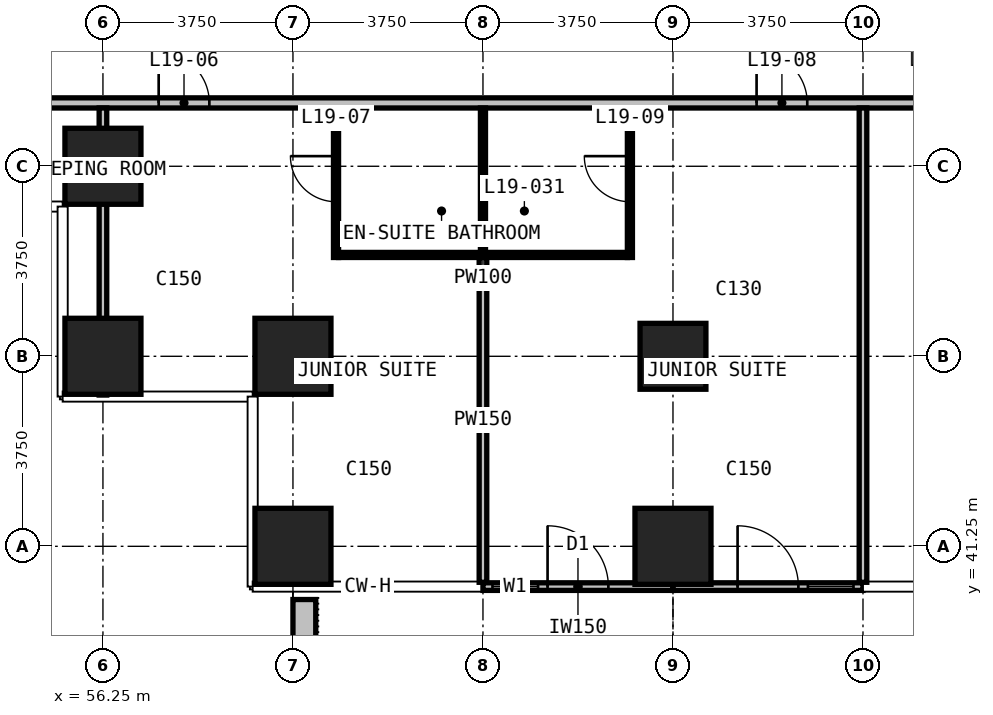
"""IFC4 building model, lengths in metres.
Left out: names, types, materials, properties, quantities, classifications, styles, units other than length and angle.
Written with IfcOpenShell. Run it as: python <this file> out.ifc"""

import sys

from ifc_helpers import new_model, si_unit, direction, frame, frame_2d, origin, origin_2d, place, context, subcontext, project, spatial, rectangle, extrude, element, fill, save


model = new_model("IFC4")
c1 = context("Model", 3, precision=1e-05, world=origin(), true_north=direction((0.0, 1.0)))
c2 = subcontext(c1, "Body", "Model", "MODEL_VIEW")
j1 = project(units=[si_unit("LENGTHUNIT", "METRE"), si_unit("PLANEANGLEUNIT", "RADIAN")], contexts=[c1])
p1 = place(None, origin())
s1 = spatial("IfcSite", under=j1, at=p1, CompositionType="ELEMENT")
p2 = place(p1, origin())
s2 = spatial("IfcBuilding", under=s1, at=p2, CompositionType="ELEMENT")
p3 = place(p2, frame((0.0, 0.0, 82.4)))
s3 = spatial("IfcBuildingStorey", under=s2, at=p3, CompositionType="ELEMENT", Elevation=82.4)
for number, where, z_axis, x_axis in (
    (1, (56.25, 45.0, 0.0), (0.0, 0.0, 1.0), (1.0, 0.0, 0.0)),
    (2, (56.25, 48.75, 0.0), (0.0, 0.0, 1.0), (1.0, 0.0, 0.0)),
    (3, (60.0, 41.25, 0.0), (0.0, 0.0, 1.0), (1.0, 0.0, 0.0)),
    (4, (60.0, 45.0, 0.0), (0.0, 0.0, 1.0), (1.0, 0.0, 0.0)),
    (5, (67.5, 41.25, 0.0), (0.0, 0.0, 1.0), (1.0, 0.0, 0.0)),
):
    element("IfcColumn", number, at=place(p3, frame(where, z_axis=z_axis, x_axis=x_axis)), inside=s3, PredefinedType="COLUMN", context=c2, shape_type="SweptSolid", body=[
        extrude(rectangle(XDim=1.5, YDim=1.5, at=origin_2d()), origin(), (0.0, 0.0, 1.0), 3.3),
    ])
p4 = place(p3, frame((67.5, 45.0, 0.0), z_axis=(0.0, 0.0, 1.0), x_axis=(1.0, 0.0, 0.0)))
e6 = element("IfcColumn", 6, at=p4, inside=s3, PredefinedType="COLUMN", context=c2, shape_type="SweptSolid", body=[
    extrude(rectangle(XDim=1.3, YDim=1.3, at=origin_2d()), origin(), (0.0, 0.0, 1.0), 3.3),
])
p5 = place(p3, frame((63.75, 40.455, 0.0), z_axis=(0.0, 0.0, 1.0), x_axis=(1.0, 0.0, 0.0)))
e7 = element("IfcWall", 7, at=p5, inside=s3, PredefinedType="SOLIDWALL", context=c2, shape_type="SweptSolid", body=[
    extrude(rectangle(XDim=3.75, YDim=0.15, at=frame_2d((1.875, 0.0))), origin(), (0.0, 0.0, 1.0), 3.0),
])
p6 = place(p5, frame((0.188, 0.0, 0.1)))
e8 = element("IfcOpeningElement", 8, at=p6, cuts=e7, PredefinedType="OPENING", context=c2, shape_type="SweptSolid", body=[
    extrude(rectangle(XDim=0.9, YDim=2.4, at=frame_2d((0.45, 1.2))), frame((0.0, 0.085, 0.0), z_axis=(0.0, -1.0, 0.0), x_axis=(1.0, 0.0, 0.0)), (0.0, 0.0, 1.0), 0.17),
])
p7 = place(p5, frame((1.275, 0.0, 0.0)))
e9 = element("IfcOpeningElement", 9, at=p7, cuts=e7, PredefinedType="OPENING", context=c2, shape_type="SweptSolid", body=[
    extrude(rectangle(XDim=1.2, YDim=2.4, at=frame_2d((0.6, 1.2))), frame((0.0, 0.085, 0.0), z_axis=(0.0, -1.0, 0.0), x_axis=(1.0, 0.0, 0.0)), (0.0, 0.0, 1.0), 0.17),
])
p8 = place(p3, frame((67.5, 40.455, 0.0), z_axis=(0.0, 0.0, 1.0), x_axis=(1.0, 0.0, 0.0)))
e10 = element("IfcWall", 10, at=p8, inside=s3, PredefinedType="SOLIDWALL", context=c2, shape_type="SweptSolid", body=[
    extrude(rectangle(XDim=3.75, YDim=0.15, at=frame_2d((1.875, 0.0))), origin(), (0.0, 0.0, 1.0), 3.0),
])
p9 = place(p8, frame((1.275, 0.0, 0.0)))
e11 = element("IfcOpeningElement", 11, at=p9, cuts=e10, PredefinedType="OPENING", context=c2, shape_type="SweptSolid", body=[
    extrude(rectangle(XDim=1.2, YDim=2.4, at=frame_2d((0.6, 1.2))), frame((0.0, 0.085, 0.0), z_axis=(0.0, -1.0, 0.0), x_axis=(1.0, 0.0, 0.0)), (0.0, 0.0, 1.0), 0.17),
])
p10 = place(p8, frame((2.663, 0.0, 0.1)))
e12 = element("IfcOpeningElement", 12, at=p10, cuts=e10, PredefinedType="OPENING", context=c2, shape_type="SweptSolid", body=[
    extrude(rectangle(XDim=0.9, YDim=2.4, at=frame_2d((0.45, 1.2))), frame((0.0, 0.085, 0.0), z_axis=(0.0, -1.0, 0.0), x_axis=(1.0, 0.0, 0.0)), (0.0, 0.0, 1.0), 0.17),
])
p11 = place(p3, frame((60.225, 40.2, 0.0), z_axis=(0.0, 0.0, 1.0), x_axis=(0.0, -1.0, 0.0)))
e13 = element("IfcWall", 13, at=p11, inside=s3, PredefinedType="USERDEFINED", context=c2, shape_type="SweptSolid", body=[
    extrude(rectangle(XDim=2.35, YDim=0.45, at=frame_2d((1.175, 0.0))), origin(), (0.0, 0.0, 1.0), 1.1),
])
p12 = place(p3, frame((51.735, 50.0, 0.0), z_axis=(0.0, 0.0, 1.0), x_axis=(1.0, 0.0, 0.0)))
e14 = element("IfcWall", 14, at=p12, inside=s3, PredefinedType="PARTITIONING", context=c2, shape_type="SweptSolid", body=[
    extrude(rectangle(XDim=46.53, YDim=0.2, at=frame_2d((23.265, 0.0))), origin(), (0.0, 0.0, 1.0), 3.0),
])
p13 = place(p12, frame((5.615, 0.0, 0.0)))
e15 = element("IfcOpeningElement", 15, at=p13, cuts=e14, PredefinedType="OPENING", context=c2, shape_type="SweptSolid", body=[
    extrude(rectangle(XDim=1.0, YDim=2.2, at=frame_2d((0.5, 1.1))), frame((0.0, 0.11, 0.0), z_axis=(0.0, -1.0, 0.0), x_axis=(1.0, 0.0, 0.0)), (0.0, 0.0, 1.0), 0.22),
])
p14 = place(p12, frame((17.415, 0.0, 0.0)))
e16 = element("IfcOpeningElement", 16, at=p14, cuts=e14, PredefinedType="OPENING", context=c2, shape_type="SweptSolid", body=[
    extrude(rectangle(XDim=1.0, YDim=2.2, at=frame_2d((0.5, 1.1))), frame((0.0, 0.11, 0.0), z_axis=(0.0, -1.0, 0.0), x_axis=(1.0, 0.0, 0.0)), (0.0, 0.0, 1.0), 0.22),
])
p15 = place(p12, frame((20.615, 0.0, 0.0)))
e17 = element("IfcOpeningElement", 17, at=p15, cuts=e14, PredefinedType="OPENING", context=c2, shape_type="SweptSolid", body=[
    extrude(rectangle(XDim=1.0, YDim=2.2, at=frame_2d((0.5, 1.1))), frame((0.0, 0.11, 0.0), z_axis=(0.0, -1.0, 0.0), x_axis=(1.0, 0.0, 0.0)), (0.0, 0.0, 1.0), 0.22),
])
p16 = place(p12, frame((32.415, 0.0, 0.0)))
e18 = element("IfcOpeningElement", 18, at=p16, cuts=e14, PredefinedType="OPENING", context=c2, shape_type="SweptSolid", body=[
    extrude(rectangle(XDim=1.0, YDim=2.2, at=frame_2d((0.5, 1.1))), frame((0.0, 0.11, 0.0), z_axis=(0.0, -1.0, 0.0), x_axis=(1.0, 0.0, 0.0)), (0.0, 0.0, 1.0), 0.22),
])
p17 = place(p12, frame((35.615, 0.0, 0.0)))
e19 = element("IfcOpeningElement", 19, at=p17, cuts=e14, PredefinedType="OPENING", context=c2, shape_type="SweptSolid", body=[
    extrude(rectangle(XDim=1.0, YDim=2.2, at=frame_2d((0.5, 1.1))), frame((0.0, 0.11, 0.0), z_axis=(0.0, -1.0, 0.0), x_axis=(1.0, 0.0, 0.0)), (0.0, 0.0, 1.0), 0.22),
])
p18 = place(p12, frame((1.8, 0.0, 0.0)))
e20 = element("IfcOpeningElement", 20, at=p18, cuts=e14, PredefinedType="OPENING", context=c2, shape_type="SweptSolid", body=[
    extrude(rectangle(XDim=0.9, YDim=2.2, at=frame_2d((0.45, 1.1))), frame((0.0, 0.11, 0.0), z_axis=(0.0, -1.0, 0.0), x_axis=(1.0, 0.0, 0.0)), (0.0, 0.0, 1.0), 0.22),
])
p19 = place(p12, frame((43.815, 0.0, 0.0)))
e21 = element("IfcOpeningElement", 21, at=p19, cuts=e14, PredefinedType="OPENING", context=c2, shape_type="SweptSolid", body=[
    extrude(rectangle(XDim=0.9, YDim=2.2, at=frame_2d((0.45, 1.1))), frame((0.0, 0.11, 0.0), z_axis=(0.0, -1.0, 0.0), x_axis=(1.0, 0.0, 0.0)), (0.0, 0.0, 1.0), 0.22),
])
p20 = place(p3, frame((56.25, 44.235, 0.0), z_axis=(0.0, 0.0, 1.0), x_axis=(0.0, 1.0, 0.0)))
e22 = element("IfcWall", 22, at=p20, inside=s3, PredefinedType="PARTITIONING", context=c2, shape_type="SweptSolid", body=[
    extrude(rectangle(XDim=5.665, YDim=0.15, at=frame_2d((2.833, 0.0))), origin(), (0.0, 0.0, 1.0), 3.0),
])
p21 = place(p3, frame((63.75, 40.54, 0.0), z_axis=(0.0, 0.0, 1.0), x_axis=(0.0, 1.0, 0.0)))
e23 = element("IfcWall", 23, at=p21, inside=s3, PredefinedType="PARTITIONING", context=c2, shape_type="SweptSolid", body=[
    extrude(rectangle(XDim=6.41, YDim=0.15, at=frame_2d((3.205, 0.0))), origin(), (0.0, 0.0, 1.0), 3.0),
])
p22 = place(p3, frame((71.25, 40.54, 0.0), z_axis=(0.0, 0.0, 1.0), x_axis=(0.0, 1.0, 0.0)))
e24 = element("IfcWall", 24, at=p22, inside=s3, PredefinedType="PARTITIONING", context=c2, shape_type="SweptSolid", body=[
    extrude(rectangle(XDim=9.36, YDim=0.15, at=frame_2d((4.68, 0.0))), origin(), (0.0, 0.0, 1.0), 3.0),
])
p23 = place(p3, frame((60.9, 47.0, 0.0), z_axis=(0.0, 0.0, 1.0), x_axis=(1.0, 0.0, 0.0)))
e25 = element("IfcWall", 25, at=p23, inside=s3, PredefinedType="PARTITIONING", context=c2, shape_type="SweptSolid", body=[
    extrude(rectangle(XDim=5.7, YDim=0.1, at=frame_2d((2.85, 0.0))), origin(), (0.0, 0.0, 1.0), 3.0),
])
p24 = place(p3, frame((60.85, 46.95, 0.0), z_axis=(0.0, 0.0, 1.0), x_axis=(0.0, 1.0, 0.0)))
e26 = element("IfcWall", 26, at=p24, inside=s3, PredefinedType="PARTITIONING", context=c2, shape_type="SweptSolid", body=[
    extrude(rectangle(XDim=2.95, YDim=0.1, at=frame_2d((1.475, 0.0))), origin(), (0.0, 0.0, 1.0), 3.0),
])
p25 = place(p24, frame((1.1, 0.0, 0.0)))
e27 = element("IfcOpeningElement", 27, at=p25, cuts=e26, PredefinedType="OPENING", context=c2, shape_type="SweptSolid", body=[
    extrude(rectangle(XDim=0.9, YDim=2.2, at=frame_2d((0.45, 1.1))), frame((0.0, 0.06, 0.0), z_axis=(0.0, -1.0, 0.0), x_axis=(1.0, 0.0, 0.0)), (0.0, 0.0, 1.0), 0.12),
])
p26 = place(p3, frame((63.75, 47.05, 0.0), z_axis=(0.0, 0.0, 1.0), x_axis=(0.0, 1.0, 0.0)))
e28 = element("IfcWall", 28, at=p26, inside=s3, PredefinedType="PARTITIONING", context=c2, shape_type="SweptSolid", body=[
    extrude(rectangle(XDim=2.85, YDim=0.1, at=frame_2d((1.425, 0.0))), origin(), (0.0, 0.0, 1.0), 3.0),
])
p27 = place(p3, frame((66.65, 46.95, 0.0), z_axis=(0.0, 0.0, 1.0), x_axis=(0.0, 1.0, 0.0)))
e29 = element("IfcWall", 29, at=p27, inside=s3, PredefinedType="PARTITIONING", context=c2, shape_type="SweptSolid", body=[
    extrude(rectangle(XDim=2.95, YDim=0.1, at=frame_2d((1.475, 0.0))), origin(), (0.0, 0.0, 1.0), 3.0),
])
p28 = place(p27, frame((1.1, 0.0, 0.0)))
e30 = element("IfcOpeningElement", 30, at=p28, cuts=e29, PredefinedType="OPENING", context=c2, shape_type="SweptSolid", body=[
    extrude(rectangle(XDim=0.9, YDim=2.2, at=frame_2d((0.45, 1.1))), frame((0.0, 0.06, 0.0), z_axis=(0.0, -1.0, 0.0), x_axis=(1.0, 0.0, 0.0)), (0.0, 0.0, 1.0), 0.12),
])
p29 = place(p6, origin())
e31 = element("IfcWindow", 31, at=p29, inside=s3, PartitioningType="SINGLE_PANEL", PredefinedType="WINDOW", context=c2, shape_type="SweptSolid", body=[
    extrude(rectangle(XDim=0.9, YDim=2.4, at=frame_2d((0.45, 1.2))), frame((0.0, 0.03, 0.0), z_axis=(0.0, -1.0, 0.0), x_axis=(1.0, 0.0, 0.0)), (0.0, 0.0, 1.0), 0.06),
])
fill(e8, e31)
p30 = place(p7, origin())
e32 = element("IfcDoor", 32, at=p30, inside=s3, OperationType="SINGLE_SWING_LEFT", PredefinedType="DOOR", context=c2, shape_type="SweptSolid", body=[
    extrude(rectangle(XDim=1.2, YDim=2.4, at=frame_2d((0.6, 1.2))), frame((0.0, 0.025, 0.0), z_axis=(0.0, -1.0, 0.0), x_axis=(1.0, 0.0, 0.0)), (0.0, 0.0, 1.0), 0.05),
])
fill(e9, e32)
p31 = place(p9, origin())
e33 = element("IfcDoor", 33, at=p31, inside=s3, OperationType="SINGLE_SWING_LEFT", PredefinedType="DOOR", context=c2, shape_type="SweptSolid", body=[
    extrude(rectangle(XDim=1.2, YDim=2.4, at=frame_2d((0.6, 1.2))), frame((0.0, 0.025, 0.0), z_axis=(0.0, -1.0, 0.0), x_axis=(1.0, 0.0, 0.0)), (0.0, 0.0, 1.0), 0.05),
])
fill(e11, e33)
p32 = place(p10, origin())
e34 = element("IfcWindow", 34, at=p32, inside=s3, PartitioningType="SINGLE_PANEL", PredefinedType="WINDOW", context=c2, shape_type="SweptSolid", body=[
    extrude(rectangle(XDim=0.9, YDim=2.4, at=frame_2d((0.45, 1.2))), frame((0.0, 0.03, 0.0), z_axis=(0.0, -1.0, 0.0), x_axis=(1.0, 0.0, 0.0)), (0.0, 0.0, 1.0), 0.06),
])
fill(e12, e34)
p33 = place(p13, origin())
e35 = element("IfcDoor", 35, at=p33, inside=s3, OperationType="SINGLE_SWING_RIGHT", PredefinedType="DOOR", context=c2, shape_type="SweptSolid", body=[
    extrude(rectangle(XDim=1.0, YDim=2.2, at=frame_2d((0.5, 1.1))), frame((0.0, 0.025, 0.0), z_axis=(0.0, -1.0, 0.0), x_axis=(1.0, 0.0, 0.0)), (0.0, 0.0, 1.0), 0.05),
])
fill(e15, e35)
p34 = place(p25, origin())
e36 = element("IfcDoor", 36, at=p34, inside=s3, OperationType="SINGLE_SWING_RIGHT", PredefinedType="DOOR", context=c2, shape_type="SweptSolid", body=[
    extrude(rectangle(XDim=0.9, YDim=2.2, at=frame_2d((0.45, 1.1))), frame((0.0, 0.025, 0.0), z_axis=(0.0, -1.0, 0.0), x_axis=(1.0, 0.0, 0.0)), (0.0, 0.0, 1.0), 0.05),
])
fill(e27, e36)
p35 = place(p14, origin())
e37 = element("IfcDoor", 37, at=p35, inside=s3, OperationType="SINGLE_SWING_LEFT", PredefinedType="DOOR", context=c2, shape_type="SweptSolid", body=[
    extrude(rectangle(XDim=1.0, YDim=2.2, at=frame_2d((0.5, 1.1))), frame((0.0, 0.025, 0.0), z_axis=(0.0, -1.0, 0.0), x_axis=(1.0, 0.0, 0.0)), (0.0, 0.0, 1.0), 0.05),
])
fill(e16, e37)
p36 = place(p28, origin())
e38 = element("IfcDoor", 38, at=p36, inside=s3, OperationType="SINGLE_SWING_RIGHT", PredefinedType="DOOR", context=c2, shape_type="SweptSolid", body=[
    extrude(rectangle(XDim=0.9, YDim=2.2, at=frame_2d((0.45, 1.1))), frame((0.0, 0.025, 0.0), z_axis=(0.0, -1.0, 0.0), x_axis=(1.0, 0.0, 0.0)), (0.0, 0.0, 1.0), 0.05),
])
fill(e30, e38)
save(model, sys.argv[1])
